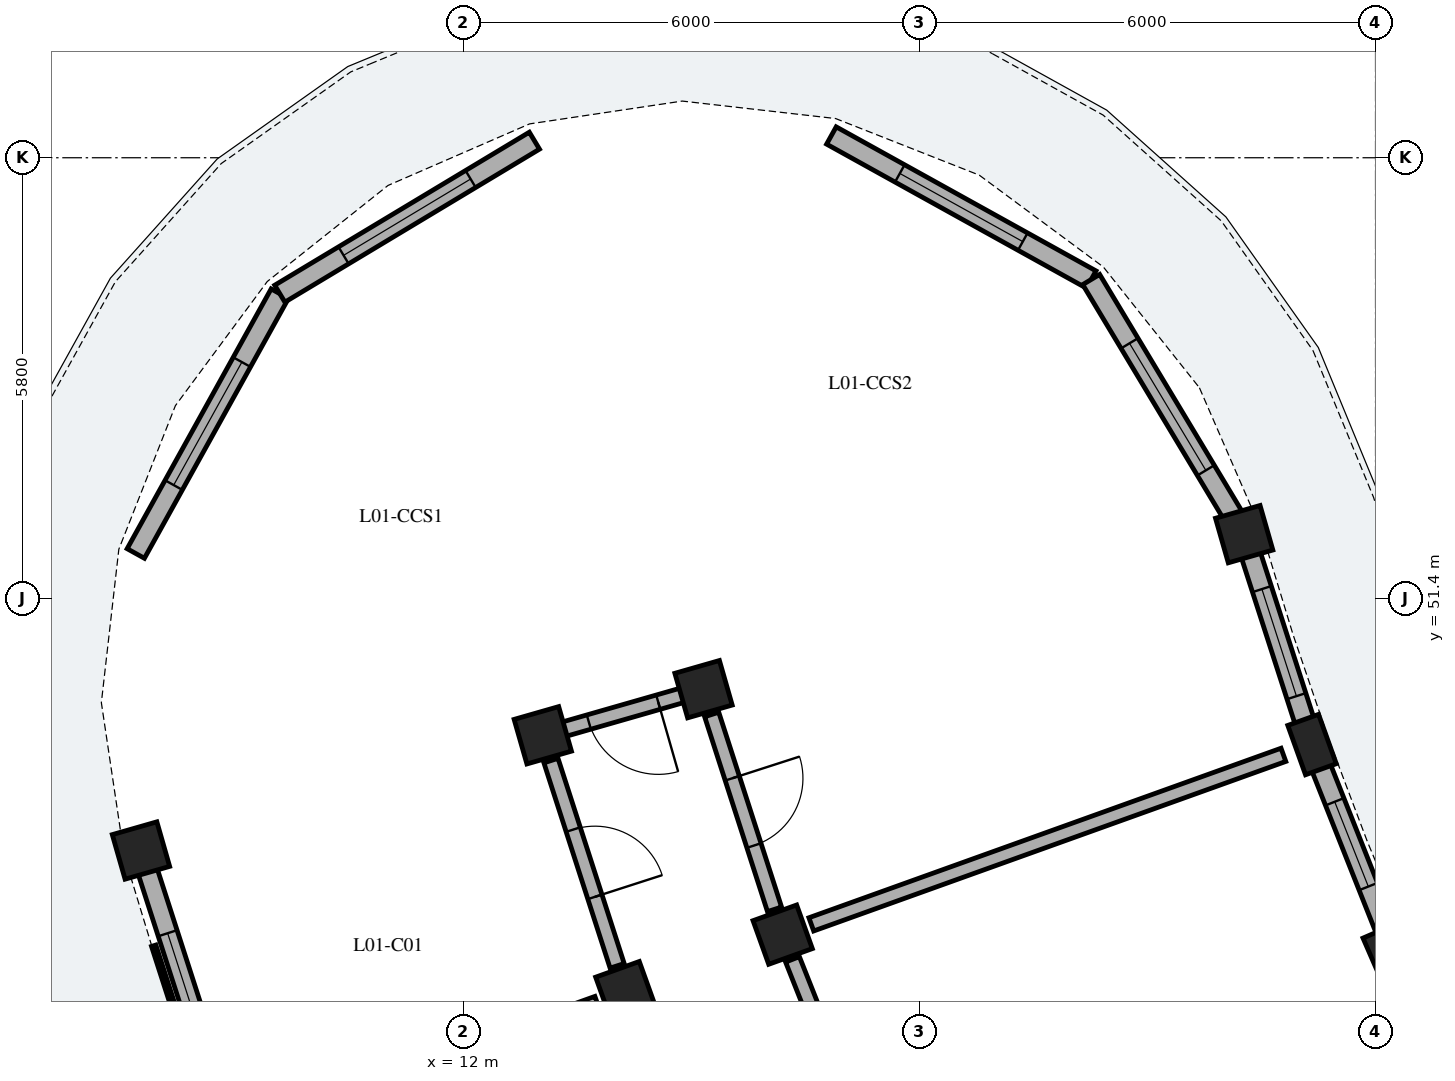
"""IFC4 building model, lengths in metres.
Left out: names, types, materials, properties, quantities, classifications, styles, units other than length and angle.
Written with IfcOpenShell. Run it as: python <this file> out.ifc"""

import sys

from ifc_helpers import new_model, si_unit, direction, frame, frame_2d, origin, origin_2d, place, context, subcontext, project, spatial, rectangle, extrude, element, fill, save


model = new_model("IFC4")
c1 = context("Model", 3, precision=1e-05, world=origin(), true_north=direction((0.0, 1.0)))
c2 = subcontext(c1, "Body", "Model", "MODEL_VIEW")
j1 = project(units=[si_unit("LENGTHUNIT", "METRE"), si_unit("PLANEANGLEUNIT", "RADIAN")], contexts=[c1])
p1 = place(None, origin())
s1 = spatial("IfcSite", under=j1, at=p1, CompositionType="ELEMENT")
p2 = place(p1, origin())
s2 = spatial("IfcBuilding", under=s1, at=p2, CompositionType="ELEMENT")
p3 = place(p2, frame((0.0, 0.0, 4.76)))
s3 = spatial("IfcBuildingStorey", under=s2, at=p3, CompositionType="ELEMENT", Elevation=4.76)
for number, where, z_axis, x_axis in (
    (1, (22.272, 52.248, 0.0), (0.0, 0.0, 1.0), (-0.961, -0.276, 0.0)),
    (2, (15.159, 50.208, 0.0), (0.0, 0.0, 1.0), (-0.961, -0.276, 0.0)),
    (3, (13.044, 49.602, 0.0), (0.0, 0.0, 1.0), (-0.961, -0.276, 0.0)),
    (4, (7.757, 48.086, 0.0), (0.0, 0.0, 1.0), (-0.961, -0.276, 0.0)),
):
    element("IfcColumn", number, at=place(p3, frame(where, z_axis=z_axis, x_axis=x_axis)), inside=s3, PredefinedType="COLUMN", context=c2, shape_type="SweptSolid", body=[
        extrude(rectangle(XDim=0.61, YDim=0.61, at=origin_2d()), origin(), (0.0, 0.0, 1.0), 3.825),
    ])
p4 = place(p3, frame((23.165, 49.479, 0.0), z_axis=(0.0, 0.0, 1.0), x_axis=(-0.941176015256, -0.337916718003, 0.0)))
e5 = element("IfcColumn", 5, at=p4, inside=s3, PredefinedType="PILASTER", context=c2, shape_type="SweptSolid", body=[
    extrude(rectangle(XDim=0.43, YDim=0.69, at=origin_2d()), origin(), (0.0, 0.0, 1.0), 3.825),
])
for number, where, z_axis, x_axis in (
    (6, (16.2, 46.979, 0.0), (0.0, 0.0, 1.0), (-0.941, -0.338, 0.0)),
    (7, (14.129, 46.236, 0.0), (0.0, 0.0, 1.0), (-0.941, -0.338, 0.0)),
    (8, (24.237, 46.776, 0.0), (0.0, 0.0, 1.0), (-0.917, -0.399, 0.0)),
):
    element("IfcColumn", number, at=place(p3, frame(where, z_axis=z_axis, x_axis=x_axis)), inside=s3, PredefinedType="COLUMN", context=c2, shape_type="SweptSolid", body=[
        extrude(rectangle(XDim=0.61, YDim=0.61, at=origin_2d()), origin(), (0.0, 0.0, 1.0), 3.825),
    ])
p5 = place(p3, frame((7.841, 47.824, 0.0), z_axis=(0.0, 0.0, 1.0), x_axis=(0.306963342814, -0.951721338506, 0.0)))
e9 = element("IfcWall", 9, at=p5, inside=s3, PredefinedType="SOLIDWALL", context=c2, shape_type="SweptSolid", body=[
    extrude(rectangle(XDim=3.437, YDim=0.26, at=frame_2d((1.718, 0.0))), origin(), (0.0, 0.0, 1.0), 3.075),
])
p6 = place(p5, frame((0.868, 0.0, 0.55)))
e10 = element("IfcOpeningElement", 10, at=p6, cuts=e9, PredefinedType="OPENING", context=c2, shape_type="SweptSolid", body=[
    extrude(rectangle(XDim=1.7, YDim=1.8, at=frame_2d((0.85, 0.9))), frame((0.0, 0.14, 0.0), z_axis=(0.0, -1.0, 0.0), x_axis=(1.0, 0.0, 0.0)), (0.0, 0.0, 1.0), 0.28),
])
p7 = place(p3, frame((22.356, 51.986, 0.0), z_axis=(0.0, 0.0, 1.0), x_axis=(0.306909552229, -0.951738686169, 0.0)))
e11 = element("IfcWall", 11, at=p7, inside=s3, PredefinedType="SOLIDWALL", context=c2, shape_type="SweptSolid", body=[
    extrude(rectangle(XDim=2.448, YDim=0.26, at=frame_2d((1.224, 0.0))), origin(), (0.0, 0.0, 1.0), 3.075),
])
p8 = place(p7, frame((0.484, 0.0, 0.55)))
e12 = element("IfcOpeningElement", 12, at=p8, cuts=e11, PredefinedType="OPENING", context=c2, shape_type="SweptSolid", body=[
    extrude(rectangle(XDim=1.48, YDim=1.62, at=frame_2d((0.74, 0.81))), frame((0.0, 0.14, 0.0), z_axis=(0.0, -1.0, 0.0), x_axis=(1.0, 0.0, 0.0)), (0.0, 0.0, 1.0), 0.28),
])
p9 = place(p3, frame((23.233, 49.308, 0.0), z_axis=(0.0, 0.0, 1.0), x_axis=(0.368500941406, -0.92962737491, 0.0)))
e13 = element("IfcWall", 13, at=p9, inside=s3, PredefinedType="SOLIDWALL", context=c2, shape_type="SweptSolid", body=[
    extrude(rectangle(XDim=2.449, YDim=0.26, at=frame_2d((1.224, 0.0))), origin(), (0.0, 0.0, 1.0), 3.075),
])
p10 = place(p9, frame((0.625, 0.0, 0.55)))
e14 = element("IfcOpeningElement", 14, at=p10, cuts=e13, PredefinedType="OPENING", context=c2, shape_type="SweptSolid", body=[
    extrude(rectangle(XDim=1.2, YDim=1.51, at=frame_2d((0.6, 0.755))), frame((0.0, 0.14, 0.0), z_axis=(0.0, -1.0, 0.0), x_axis=(1.0, 0.0, 0.0)), (0.0, 0.0, 1.0), 0.28),
])
p11 = place(p3, frame((7.689, 51.993, 0.0), z_axis=(0.0, 0.0, 1.0), x_axis=(0.48481530532, 0.874616555828, 0.0)))
e15 = element("IfcWall", 15, at=p11, inside=s3, PredefinedType="SOLIDWALL", context=c2, shape_type="SweptSolid", body=[
    extrude(rectangle(XDim=3.908, YDim=0.26, at=frame_2d((1.954, 0.0))), origin(), (0.0, 0.0, 1.0), 3.075),
])
p12 = place(p11, frame((1.029, 0.0, 0.4)))
e16 = element("IfcOpeningElement", 16, at=p12, cuts=e15, PredefinedType="OPENING", context=c2, shape_type="SweptSolid", body=[
    extrude(rectangle(XDim=1.85, YDim=1.72, at=frame_2d((0.925, 0.86))), frame((0.0, 0.14, 0.0), z_axis=(0.0, -1.0, 0.0), x_axis=(1.0, 0.0, 0.0)), (0.0, 0.0, 1.0), 0.28),
])
p13 = place(p3, frame((9.583, 55.412, 0.0), z_axis=(0.0, 0.0, 1.0), x_axis=(0.857178568309, 0.515019321998, 0.0)))
e17 = element("IfcWall", 17, at=p13, inside=s3, PredefinedType="SOLIDWALL", context=c2, shape_type="SweptSolid", body=[
    extrude(rectangle(XDim=3.908, YDim=0.26, at=frame_2d((1.954, 0.0))), origin(), (0.0, 0.0, 1.0), 3.075),
])
p14 = place(p13, frame((0.979, 0.0, 0.4)))
e18 = element("IfcOpeningElement", 18, at=p14, cuts=e17, PredefinedType="OPENING", context=c2, shape_type="SweptSolid", body=[
    extrude(rectangle(XDim=1.95, YDim=1.78, at=frame_2d((0.975, 0.89))), frame((0.0, 0.14, 0.0), z_axis=(0.0, -1.0, 0.0), x_axis=(1.0, 0.0, 0.0)), (0.0, 0.0, 1.0), 0.28),
])
p15 = place(p3, frame((16.841, 57.493, 0.0), z_axis=(0.0, 0.0, 1.0), x_axis=(0.874616555828, -0.48481530532, 0.0)))
e19 = element("IfcWall", 19, at=p15, inside=s3, PredefinedType="SOLIDWALL", context=c2, shape_type="SweptSolid", body=[
    extrude(rectangle(XDim=3.908, YDim=0.26, at=frame_2d((1.954, 0.0))), origin(), (0.0, 0.0, 1.0), 3.075),
])
p16 = place(p15, frame((1.029, 0.0, 0.4)))
e20 = element("IfcOpeningElement", 20, at=p16, cuts=e19, PredefinedType="OPENING", context=c2, shape_type="SweptSolid", body=[
    extrude(rectangle(XDim=1.85, YDim=1.72, at=frame_2d((0.925, 0.86))), frame((0.0, 0.14, 0.0), z_axis=(0.0, -1.0, 0.0), x_axis=(1.0, 0.0, 0.0)), (0.0, 0.0, 1.0), 0.28),
])
p17 = place(p3, frame((20.259, 55.598, 0.0), z_axis=(0.0, 0.0, 1.0), x_axis=(0.515037642827, -0.857167560324, 0.0)))
e21 = element("IfcWall", 21, at=p17, inside=s3, PredefinedType="SOLIDWALL", context=c2, shape_type="SweptSolid", body=[
    extrude(rectangle(XDim=3.908, YDim=0.26, at=frame_2d((1.954, 0.0))), origin(), (0.0, 0.0, 1.0), 3.075),
])
p18 = place(p17, frame((0.979, 0.0, 0.4)))
e22 = element("IfcOpeningElement", 22, at=p18, cuts=e21, PredefinedType="OPENING", context=c2, shape_type="SweptSolid", body=[
    extrude(rectangle(XDim=1.95, YDim=1.78, at=frame_2d((0.975, 0.89))), frame((0.0, 0.14, 0.0), z_axis=(0.0, -1.0, 0.0), x_axis=(1.0, 0.0, 0.0)), (0.0, 0.0, 1.0), 0.28),
])
p19 = place(p3, frame((13.151, 49.269, 0.0), z_axis=(0.0, 0.0, 1.0), x_axis=(0.30694495224, -0.951727269912, 0.0)))
e23 = element("IfcWall", 23, at=p19, inside=s3, PredefinedType="PARTITIONING", context=c2, shape_type="SweptSolid", body=[
    extrude(rectangle(XDim=2.837, YDim=0.195, at=frame_2d((1.418, 0.0))), origin(), (0.0, 0.0, 1.0), 3.09),
])
p20 = place(p19, frame((0.954, 0.0, 0.0)))
e24 = element("IfcOpeningElement", 24, at=p20, cuts=e23, PredefinedType="OPENING", context=c2, shape_type="SweptSolid", body=[
    extrude(rectangle(XDim=0.93, YDim=2.12, at=frame_2d((0.465, 1.06))), frame((0.0, 0.107, 0.0), z_axis=(0.0, -1.0, 0.0), x_axis=(1.0, 0.0, 0.0)), (0.0, 0.0, 1.0), 0.215),
])
p21 = place(p3, frame((15.266, 49.875, 0.0), z_axis=(0.0, 0.0, 1.0), x_axis=(0.306883578189, -0.951747061691, 0.0)))
e25 = element("IfcWall", 25, at=p21, inside=s3, PredefinedType="PARTITIONING", context=c2, shape_type="SweptSolid", body=[
    extrude(rectangle(XDim=2.693, YDim=0.195, at=frame_2d((1.346, 0.0))), origin(), (0.0, 0.0, 1.0), 3.09),
])
p22 = place(p21, frame((0.882, 0.0, 0.0)))
e26 = element("IfcOpeningElement", 26, at=p22, cuts=e25, PredefinedType="OPENING", context=c2, shape_type="SweptSolid", body=[
    extrude(rectangle(XDim=0.93, YDim=2.12, at=frame_2d((0.465, 1.06))), frame((0.0, 0.107, 0.0), z_axis=(0.0, -1.0, 0.0), x_axis=(1.0, 0.0, 0.0)), (0.0, 0.0, 1.0), 0.215),
])
p23 = place(p3, frame((13.753, 46.1, 0.0), z_axis=(0.0, 0.0, 1.0), x_axis=(-0.941182387398, -0.337898969591, 0.0)))
e27 = element("IfcWall", 27, at=p23, inside=s3, PredefinedType="PLUMBINGWALL", context=c2, shape_type="SweptSolid", body=[
    extrude(rectangle(XDim=4.7, YDim=0.14, at=frame_2d((2.35, 0.0))), origin(), (0.0, 0.0, 1.0), 3.09),
])
p24 = place(p23, frame((1.925, 0.0, 0.0)))
e28 = element("IfcOpeningElement", 28, at=p24, cuts=e27, PredefinedType="OPENING", context=c2, shape_type="SweptSolid", body=[
    extrude(rectangle(XDim=0.85, YDim=2.05, at=frame_2d((0.425, 1.025))), frame((0.0, 0.08, 0.0), z_axis=(0.0, -1.0, 0.0), x_axis=(1.0, 0.0, 0.0)), (0.0, 0.0, 1.0), 0.16),
])
p25 = place(p3, frame((22.788, 49.344, 0.0), z_axis=(0.0, 0.0, 1.0), x_axis=(-0.941179890997, -0.337905922978, 0.0)))
e29 = element("IfcWall", 29, at=p25, inside=s3, PredefinedType="PARTITIONING", context=c2, shape_type="SweptSolid", body=[
    extrude(rectangle(XDim=6.6, YDim=0.185, at=frame_2d((3.3, 0.0))), origin(), (0.0, 0.0, 1.0), 3.09),
])
p26 = place(p3, frame((16.329, 46.654, 0.0), z_axis=(0.0, 0.0, 1.0), x_axis=(0.368528468945, -0.929616462622, 0.0)))
e30 = element("IfcWall", 30, at=p26, inside=s3, PredefinedType="PARTITIONING", context=c2, shape_type="SweptSolid", body=[
    extrude(rectangle(XDim=2.693, YDim=0.195, at=frame_2d((1.346, 0.0))), origin(), (0.0, 0.0, 1.0), 3.09),
])
p27 = place(p26, frame((0.852, 0.0, 0.0)))
e31 = element("IfcOpeningElement", 31, at=p27, cuts=e30, PredefinedType="OPENING", context=c2, shape_type="SweptSolid", body=[
    extrude(rectangle(XDim=0.99, YDim=2.16, at=frame_2d((0.495, 1.08))), frame((0.0, 0.107, 0.0), z_axis=(0.0, -1.0, 0.0), x_axis=(1.0, 0.0, 0.0)), (0.0, 0.0, 1.0), 0.215),
])
p28 = place(p3, frame((15.111, 50.194, 0.0), z_axis=(0.0, 0.0, 1.0), x_axis=(-0.961264701934, -0.275626872449, 0.0)))
e32 = element("IfcWall", 32, at=p28, inside=s3, PredefinedType="PARTITIONING", context=c2, shape_type="SweptSolid", body=[
    extrude(rectangle(XDim=2.1, YDim=0.195, at=frame_2d((1.05, 0.0))), origin(), (0.0, 0.0, 1.0), 3.09),
])
p29 = place(p28, frame((0.57, 0.0, 0.0)))
e33 = element("IfcOpeningElement", 33, at=p29, cuts=e32, PredefinedType="OPENING", context=c2, shape_type="SweptSolid", body=[
    extrude(rectangle(XDim=0.95, YDim=2.13, at=frame_2d((0.475, 1.065))), frame((0.0, 0.107, 0.0), z_axis=(0.0, -1.0, 0.0), x_axis=(1.0, 0.0, 0.0)), (0.0, 0.0, 1.0), 0.215),
])
p30 = place(p6, origin())
e34 = element("IfcWindow", 34, at=p30, inside=s3, PartitioningType="SINGLE_PANEL", PredefinedType="WINDOW", context=c2, shape_type="SweptSolid", body=[
    extrude(rectangle(XDim=1.7, YDim=1.8, at=frame_2d((0.85, 0.9))), frame((0.0, 0.03, 0.0), z_axis=(0.0, -1.0, 0.0), x_axis=(1.0, 0.0, 0.0)), (0.0, 0.0, 1.0), 0.06),
])
fill(e10, e34)
p31 = place(p8, origin())
e35 = element("IfcWindow", 35, at=p31, inside=s3, PartitioningType="SINGLE_PANEL", PredefinedType="WINDOW", context=c2, shape_type="SweptSolid", body=[
    extrude(rectangle(XDim=1.48, YDim=1.62, at=frame_2d((0.74, 0.81))), frame((0.0, 0.03, 0.0), z_axis=(0.0, -1.0, 0.0), x_axis=(1.0, 0.0, 0.0)), (0.0, 0.0, 1.0), 0.06),
])
fill(e12, e35)
p32 = place(p10, origin())
e36 = element("IfcWindow", 36, at=p32, inside=s3, PartitioningType="SINGLE_PANEL", PredefinedType="WINDOW", context=c2, shape_type="SweptSolid", body=[
    extrude(rectangle(XDim=1.2, YDim=1.51, at=frame_2d((0.6, 0.755))), frame((0.0, 0.03, 0.0), z_axis=(0.0, -1.0, 0.0), x_axis=(1.0, 0.0, 0.0)), (0.0, 0.0, 1.0), 0.06),
])
fill(e14, e36)
p33 = place(p12, origin())
e37 = element("IfcWindow", 37, at=p33, inside=s3, PartitioningType="SINGLE_PANEL", PredefinedType="WINDOW", context=c2, shape_type="SweptSolid", body=[
    extrude(rectangle(XDim=1.85, YDim=1.72, at=frame_2d((0.925, 0.86))), frame((0.0, 0.03, 0.0), z_axis=(0.0, -1.0, 0.0), x_axis=(1.0, 0.0, 0.0)), (0.0, 0.0, 1.0), 0.06),
])
fill(e16, e37)
p34 = place(p14, origin())
e38 = element("IfcWindow", 38, at=p34, inside=s3, PartitioningType="SINGLE_PANEL", PredefinedType="WINDOW", context=c2, shape_type="SweptSolid", body=[
    extrude(rectangle(XDim=1.95, YDim=1.78, at=frame_2d((0.975, 0.89))), frame((0.0, 0.03, 0.0), z_axis=(0.0, -1.0, 0.0), x_axis=(1.0, 0.0, 0.0)), (0.0, 0.0, 1.0), 0.06),
])
fill(e18, e38)
p35 = place(p16, origin())
e39 = element("IfcWindow", 39, at=p35, inside=s3, PartitioningType="SINGLE_PANEL", PredefinedType="WINDOW", context=c2, shape_type="SweptSolid", body=[
    extrude(rectangle(XDim=1.85, YDim=1.72, at=frame_2d((0.925, 0.86))), frame((0.0, 0.03, 0.0), z_axis=(0.0, -1.0, 0.0), x_axis=(1.0, 0.0, 0.0)), (0.0, 0.0, 1.0), 0.06),
])
fill(e20, e39)
p36 = place(p18, origin())
e40 = element("IfcWindow", 40, at=p36, inside=s3, PartitioningType="SINGLE_PANEL", PredefinedType="WINDOW", context=c2, shape_type="SweptSolid", body=[
    extrude(rectangle(XDim=1.95, YDim=1.78, at=frame_2d((0.975, 0.89))), frame((0.0, 0.03, 0.0), z_axis=(0.0, -1.0, 0.0), x_axis=(1.0, 0.0, 0.0)), (0.0, 0.0, 1.0), 0.06),
])
fill(e22, e40)
p37 = place(p20, origin())
e41 = element("IfcDoor", 41, at=p37, inside=s3, OperationType="SINGLE_SWING_RIGHT", PredefinedType="DOOR", context=c2, shape_type="SweptSolid", body=[
    extrude(rectangle(XDim=0.93, YDim=2.12, at=frame_2d((0.465, 1.06))), frame((0.0, 0.025, 0.0), z_axis=(0.0, -1.0, 0.0), x_axis=(1.0, 0.0, 0.0)), (0.0, 0.0, 1.0), 0.05),
])
fill(e24, e41)
p38 = place(p22, origin())
e42 = element("IfcDoor", 42, at=p38, inside=s3, OperationType="SINGLE_SWING_LEFT", PredefinedType="DOOR", context=c2, shape_type="SweptSolid", body=[
    extrude(rectangle(XDim=0.93, YDim=2.12, at=frame_2d((0.465, 1.06))), frame((0.0, 0.025, 0.0), z_axis=(0.0, -1.0, 0.0), x_axis=(1.0, 0.0, 0.0)), (0.0, 0.0, 1.0), 0.05),
])
fill(e26, e42)
p39 = place(p29, origin())
e43 = element("IfcDoor", 43, at=p39, inside=s3, OperationType="SINGLE_SWING_LEFT", PredefinedType="DOOR", context=c2, shape_type="SweptSolid", body=[
    extrude(rectangle(XDim=0.95, YDim=2.13, at=frame_2d((0.475, 1.065))), frame((0.0, 0.025, 0.0), z_axis=(0.0, -1.0, 0.0), x_axis=(1.0, 0.0, 0.0)), (0.0, 0.0, 1.0), 0.05),
])
fill(e33, e43)
save(model, sys.argv[1])
